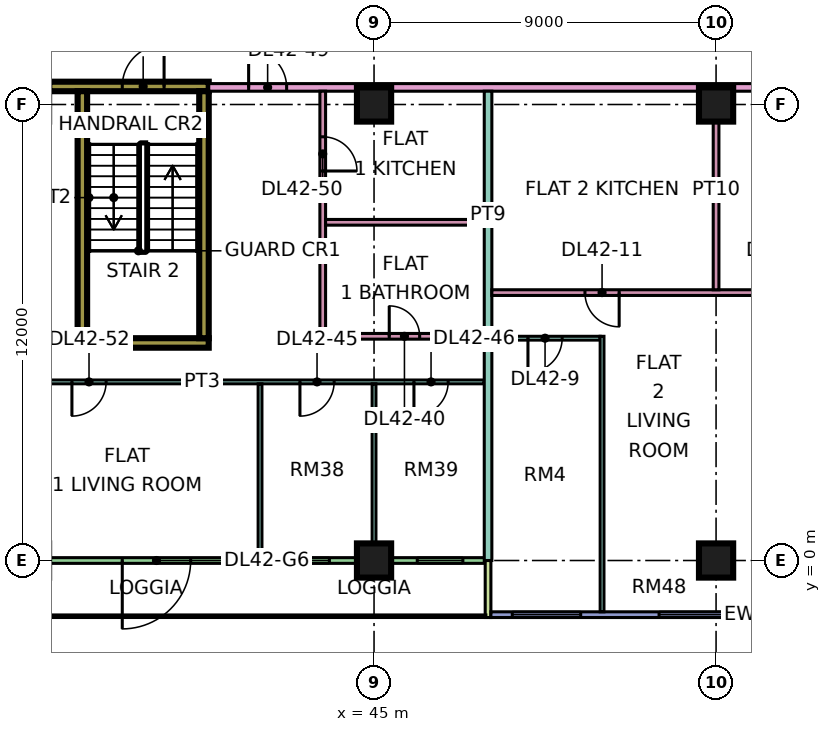
"""IFC4 building model, lengths in metres.
Left out: names, types, materials, properties, quantities, classifications, styles, units other than length and angle.
Written with IfcOpenShell. Run it as: python <this file> out.ifc"""

import sys

from ifc_helpers import new_model, si_unit, direction, frame, frame_2d, origin, origin_2d, place, context, subcontext, project, spatial, rectangle, extrude, element, fill, save


model = new_model("IFC4")
c1 = context("Model", 3, precision=1e-05, world=origin(), true_north=direction((0.0, 1.0)))
c2 = subcontext(c1, "Body", "Model", "MODEL_VIEW")
j1 = project(units=[si_unit("LENGTHUNIT", "METRE"), si_unit("PLANEANGLEUNIT", "RADIAN")], contexts=[c1])
p1 = place(None, origin())
s1 = spatial("IfcSite", under=j1, at=p1, CompositionType="ELEMENT")
p2 = place(p1, origin())
s2 = spatial("IfcBuilding", under=s1, at=p2, CompositionType="ELEMENT")
p3 = place(p2, frame((0.0, 0.0, 183.65)))
s3 = spatial("IfcBuildingStorey", under=s2, at=p3, CompositionType="ELEMENT", Elevation=183.65)
for number, where, z_axis, x_axis in (
    (1, (45.0, 0.0, 0.0), (0.0, 0.0, 1.0), (1.0, 0.0, 0.0)),
    (2, (45.0, 12.0, 0.0), (0.0, 0.0, 1.0), (1.0, 0.0, 0.0)),
    (3, (54.0, 0.0, 0.0), (0.0, 0.0, 1.0), (1.0, 0.0, 0.0)),
    (4, (54.0, 12.0, 0.0), (0.0, 0.0, 1.0), (1.0, 0.0, 0.0)),
):
    element("IfcColumn", number, at=place(p3, frame(where, z_axis=z_axis, x_axis=x_axis)), inside=s3, PredefinedType="COLUMN", context=c2, shape_type="SweptSolid", body=[
        extrude(rectangle(XDim=0.9, YDim=0.9, at=origin_2d()), origin(), (0.0, 0.0, 1.0), 3.75),
    ])
p4 = place(p3, frame((37.2, 5.725, 0.0), z_axis=(0.0, 0.0, 1.0), x_axis=(1.0, 0.0, 0.0)))
e5 = element("IfcWall", 5, at=p4, inside=s3, PredefinedType="SHEAR", context=c2, shape_type="SweptSolid", body=[
    extrude(rectangle(XDim=3.45, YDim=0.25, at=frame_2d((1.725, 0.0))), origin(), (0.0, 0.0, 1.0), 3.75),
])
p5 = place(p3, frame((36.45, 12.475, 0.0), z_axis=(0.0, 0.0, 1.0), x_axis=(1.0, 0.0, 0.0)))
e6 = element("IfcWall", 6, at=p5, inside=s3, PredefinedType="SHEAR", context=c2, shape_type="SweptSolid", body=[
    extrude(rectangle(XDim=4.2, YDim=0.25, at=frame_2d((2.1, 0.0))), origin(), (0.0, 0.0, 1.0), 3.75),
])
p6 = place(p5, frame((1.925, 0.0, 0.0)))
e7 = element("IfcOpeningElement", 7, at=p6, cuts=e6, PredefinedType="OPENING", context=c2, shape_type="SweptSolid", body=[
    extrude(rectangle(XDim=1.1, YDim=2.2, at=frame_2d((0.55, 1.1))), frame((0.0, 0.135, 0.0), z_axis=(0.0, -1.0, 0.0), x_axis=(1.0, 0.0, 0.0)), (0.0, 0.0, 1.0), 0.27),
])
for number, where, z_axis, x_axis in (
    (8, (37.325, 5.85, 0.0), (0.0, 0.0, 1.0), (0.0, 1.0, 0.0)),
    (9, (40.525, 5.85, 0.0), (0.0, 0.0, 1.0), (0.0, 1.0, 0.0)),
):
    element("IfcWall", number, at=place(p3, frame(where, z_axis=z_axis, x_axis=x_axis)), inside=s3, PredefinedType="SHEAR", context=c2, shape_type="SweptSolid", body=[
        extrude(rectangle(XDim=6.5, YDim=0.25, at=frame_2d((3.25, 0.0))), origin(), (0.0, 0.0, 1.0), 3.75),
    ])
p7 = place(p3, frame((36.075, 0.0, 0.0), z_axis=(0.0, 0.0, 1.0), x_axis=(1.0, 0.0, 0.0)))
e10 = element("IfcWall", 10, at=p7, inside=s3, PredefinedType="SOLIDWALL", context=c2, shape_type="SweptSolid", body=[
    extrude(rectangle(XDim=11.85, YDim=0.15, at=frame_2d((5.925, 0.0))), origin(), (0.0, 0.0, 1.0), 3.35),
])
p8 = place(p7, frame((2.3, 0.0, 0.0)))
e11 = element("IfcOpeningElement", 11, at=p8, cuts=e10, PredefinedType="OPENING", context=c2, shape_type="SweptSolid", body=[
    extrude(rectangle(XDim=1.8, YDim=2.4, at=frame_2d((0.9, 1.2))), frame((0.0, 0.085, 0.0), z_axis=(0.0, -1.0, 0.0), x_axis=(1.0, 0.0, 0.0)), (0.0, 0.0, 1.0), 0.17),
])
p9 = place(p7, frame((6.55, 0.0, 0.45)))
e12 = element("IfcOpeningElement", 12, at=p9, cuts=e10, PredefinedType="OPENING", context=c2, shape_type="SweptSolid", body=[
    extrude(rectangle(XDim=1.2, YDim=2.4, at=frame_2d((0.6, 1.2))), frame((0.0, 0.085, 0.0), z_axis=(0.0, -1.0, 0.0), x_axis=(1.0, 0.0, 0.0)), (0.0, 0.0, 1.0), 0.17),
])
p10 = place(p7, frame((10.062, 0.0, 0.45)))
e13 = element("IfcOpeningElement", 13, at=p10, cuts=e10, PredefinedType="OPENING", context=c2, shape_type="SweptSolid", body=[
    extrude(rectangle(XDim=1.2, YDim=2.4, at=frame_2d((0.6, 1.2))), frame((0.0, 0.085, 0.0), z_axis=(0.0, -1.0, 0.0), x_axis=(1.0, 0.0, 0.0)), (0.0, 0.0, 1.0), 0.17),
])
p11 = place(p3, frame((48.0, -1.5, 0.0), z_axis=(0.0, 0.0, 1.0), x_axis=(0.0, 1.0, 0.0)))
e14 = element("IfcWall", 14, at=p11, inside=s3, PredefinedType="SOLIDWALL", context=c2, shape_type="SweptSolid", body=[
    extrude(rectangle(XDim=1.5, YDim=0.15, at=frame_2d((0.75, 0.0))), origin(), (0.0, 0.0, 1.0), 3.35),
])
p12 = place(p3, frame((48.075, -1.425, 0.0), z_axis=(0.0, 0.0, 1.0), x_axis=(1.0, 0.0, 0.0)))
e15 = element("IfcWall", 15, at=p12, inside=s3, PredefinedType="SOLIDWALL", context=c2, shape_type="SweptSolid", body=[
    extrude(rectangle(XDim=13.425, YDim=0.15, at=frame_2d((6.712, 0.0))), origin(), (0.0, 0.0, 1.0), 3.35),
])
p13 = place(p12, frame((0.562, 0.0, 0.45)))
e16 = element("IfcOpeningElement", 16, at=p13, cuts=e15, PredefinedType="OPENING", context=c2, shape_type="SweptSolid", body=[
    extrude(rectangle(XDim=1.8, YDim=2.4, at=frame_2d((0.9, 1.2))), frame((0.0, 0.085, 0.0), z_axis=(0.0, -1.0, 0.0), x_axis=(1.0, 0.0, 0.0)), (0.0, 0.0, 1.0), 0.17),
])
p14 = place(p12, frame((4.425, 0.0, 0.45)))
e17 = element("IfcOpeningElement", 17, at=p14, cuts=e15, PredefinedType="OPENING", context=c2, shape_type="SweptSolid", body=[
    extrude(rectangle(XDim=3.0, YDim=2.4, at=frame_2d((1.5, 1.2))), frame((0.0, 0.085, 0.0), z_axis=(0.0, -1.0, 0.0), x_axis=(1.0, 0.0, 0.0)), (0.0, 0.0, 1.0), 0.17),
])
p15 = place(p12, frame((9.525, 0.0, 0.45)))
e18 = element("IfcOpeningElement", 18, at=p15, cuts=e15, PredefinedType="OPENING", context=c2, shape_type="SweptSolid", body=[
    extrude(rectangle(XDim=1.8, YDim=2.4, at=frame_2d((0.9, 1.2))), frame((0.0, 0.085, 0.0), z_axis=(0.0, -1.0, 0.0), x_axis=(1.0, 0.0, 0.0)), (0.0, 0.0, 1.0), 0.17),
])
p16 = place(p12, frame((12.225, 0.0, 0.45)))
e19 = element("IfcOpeningElement", 19, at=p16, cuts=e15, PredefinedType="OPENING", context=c2, shape_type="SweptSolid", body=[
    extrude(rectangle(XDim=0.9, YDim=2.4, at=frame_2d((0.45, 1.2))), frame((0.0, 0.085, 0.0), z_axis=(0.0, -1.0, 0.0), x_axis=(1.0, 0.0, 0.0)), (0.0, 0.0, 1.0), 0.17),
])
p17 = place(p3, frame((33.05, 4.7, 0.0), z_axis=(0.0, 0.0, 1.0), x_axis=(1.0, 0.0, 0.0)))
e20 = element("IfcWall", 20, at=p17, inside=s3, PredefinedType="PARTITIONING", context=c2, shape_type="SweptSolid", body=[
    extrude(rectangle(XDim=14.85, YDim=0.1, at=frame_2d((7.425, 0.0))), origin(), (0.0, 0.0, 1.0), 3.35),
])
p18 = place(p17, frame((10.0, 0.0, 0.0)))
e21 = element("IfcOpeningElement", 21, at=p18, cuts=e20, PredefinedType="OPENING", context=c2, shape_type="SweptSolid", body=[
    extrude(rectangle(XDim=0.9, YDim=2.1, at=frame_2d((0.45, 1.05))), frame((0.0, 0.06, 0.0), z_axis=(0.0, -1.0, 0.0), x_axis=(1.0, 0.0, 0.0)), (0.0, 0.0, 1.0), 0.12),
])
p19 = place(p17, frame((13.0, 0.0, 0.0)))
e22 = element("IfcOpeningElement", 22, at=p19, cuts=e20, PredefinedType="OPENING", context=c2, shape_type="SweptSolid", body=[
    extrude(rectangle(XDim=0.9, YDim=2.1, at=frame_2d((0.45, 1.05))), frame((0.0, 0.06, 0.0), z_axis=(0.0, -1.0, 0.0), x_axis=(1.0, 0.0, 0.0)), (0.0, 0.0, 1.0), 0.12),
])
p20 = place(p17, frame((4.0, 0.0, 0.0)))
e23 = element("IfcOpeningElement", 23, at=p20, cuts=e20, PredefinedType="OPENING", context=c2, shape_type="SweptSolid", body=[
    extrude(rectangle(XDim=0.9, YDim=2.1, at=frame_2d((0.45, 1.05))), frame((0.0, 0.06, 0.0), z_axis=(0.0, -1.0, 0.0), x_axis=(1.0, 0.0, 0.0)), (0.0, 0.0, 1.0), 0.12),
])
p21 = place(p3, frame((40.65, 12.45, 0.0), z_axis=(0.0, 0.0, 1.0), x_axis=(1.0, 0.0, 0.0)))
e24 = element("IfcWall", 24, at=p21, inside=s3, PredefinedType="PARTITIONING", context=c2, shape_type="SweptSolid", body=[
    extrude(rectangle(XDim=22.276, YDim=0.2, at=frame_2d((11.138, 0.0))), origin(), (0.0, 0.0, 1.0), 3.35),
])
p22 = place(p21, frame((20.1, 0.0, 0.0)))
e25 = element("IfcOpeningElement", 25, at=p22, cuts=e24, PredefinedType="OPENING", context=c2, shape_type="SweptSolid", body=[
    extrude(rectangle(XDim=1.0, YDim=2.1, at=frame_2d((0.5, 1.05))), frame((0.0, 0.11, 0.0), z_axis=(0.0, -1.0, 0.0), x_axis=(1.0, 0.0, 0.0)), (0.0, 0.0, 1.0), 0.22),
])
p23 = place(p21, frame((1.05, 0.0, 0.0)))
e26 = element("IfcOpeningElement", 26, at=p23, cuts=e24, PredefinedType="OPENING", context=c2, shape_type="SweptSolid", body=[
    extrude(rectangle(XDim=1.0, YDim=2.1, at=frame_2d((0.5, 1.05))), frame((0.0, 0.11, 0.0), z_axis=(0.0, -1.0, 0.0), x_axis=(1.0, 0.0, 0.0)), (0.0, 0.0, 1.0), 0.22),
])
p24 = place(p3, frame((42.0, 0.074, 0.0), z_axis=(0.0, 0.0, 1.0), x_axis=(0.0, 1.0, 0.0)))
e27 = element("IfcWall", 27, at=p24, inside=s3, PredefinedType="PARTITIONING", context=c2, shape_type="SweptSolid", body=[
    extrude(rectangle(XDim=4.576, YDim=0.1, at=frame_2d((2.288, 0.0))), origin(), (0.0, 0.0, 1.0), 3.35),
])
p25 = place(p3, frame((43.65, 5.825, 0.0), z_axis=(0.0, 0.0, 1.0), x_axis=(0.0, 1.0, 0.0)))
e28 = element("IfcWall", 28, at=p25, inside=s3, PredefinedType="PARTITIONING", context=c2, shape_type="SweptSolid", body=[
    extrude(rectangle(XDim=6.525, YDim=0.15, at=frame_2d((3.263, 0.0))), origin(), (0.0, 0.0, 1.0), 3.35),
])
p26 = place(p25, frame((4.425, 0.0, 0.0)))
e29 = element("IfcOpeningElement", 29, at=p26, cuts=e28, PredefinedType="OPENING", context=c2, shape_type="SweptSolid", body=[
    extrude(rectangle(XDim=0.9, YDim=2.1, at=frame_2d((0.45, 1.05))), frame((0.0, 0.085, 0.0), z_axis=(0.0, -1.0, 0.0), x_axis=(1.0, 0.0, 0.0)), (0.0, 0.0, 1.0), 0.17),
])
p27 = place(p3, frame((43.725, 5.9, 0.0), z_axis=(0.0, 0.0, 1.0), x_axis=(1.0, 0.0, 0.0)))
e30 = element("IfcWall", 30, at=p27, inside=s3, PredefinedType="PARTITIONING", context=c2, shape_type="SweptSolid", body=[
    extrude(rectangle(XDim=4.175, YDim=0.15, at=frame_2d((2.087, 0.0))), origin(), (0.0, 0.0, 1.0), 3.35),
])
p28 = place(p27, frame((1.675, 0.0, 0.0)))
e31 = element("IfcOpeningElement", 31, at=p28, cuts=e30, PredefinedType="OPENING", context=c2, shape_type="SweptSolid", body=[
    extrude(rectangle(XDim=0.8, YDim=2.1, at=frame_2d((0.4, 1.05))), frame((0.0, 0.085, 0.0), z_axis=(0.0, -1.0, 0.0), x_axis=(1.0, 0.0, 0.0)), (0.0, 0.0, 1.0), 0.17),
])
p29 = place(p3, frame((43.725, 8.9, 0.0), z_axis=(0.0, 0.0, 1.0), x_axis=(1.0, 0.0, 0.0)))
e32 = element("IfcWall", 32, at=p29, inside=s3, PredefinedType="PARTITIONING", context=c2, shape_type="SweptSolid", body=[
    extrude(rectangle(XDim=4.175, YDim=0.15, at=frame_2d((2.087, 0.0))), origin(), (0.0, 0.0, 1.0), 3.35),
])
p30 = place(p3, frame((45.0, 0.074, 0.0), z_axis=(0.0, 0.0, 1.0), x_axis=(0.0, 1.0, 0.0)))
e33 = element("IfcWall", 33, at=p30, inside=s3, PredefinedType="PARTITIONING", context=c2, shape_type="SweptSolid", body=[
    extrude(rectangle(XDim=4.576, YDim=0.1, at=frame_2d((2.288, 0.0))), origin(), (0.0, 0.0, 1.0), 3.35),
])
p31 = place(p3, frame((48.0, 0.0, 0.0), z_axis=(0.0, 0.0, 1.0), x_axis=(0.0, 1.0, 0.0)))
e34 = element("IfcWall", 34, at=p31, inside=s3, PredefinedType="PARTITIONING", context=c2, shape_type="SweptSolid", body=[
    extrude(rectangle(XDim=5.9, YDim=0.2, at=frame_2d((2.95, 0.0))), origin(), (0.0, 0.0, 1.0), 3.35),
])
p32 = place(p3, frame((48.0, 5.825, 0.0), z_axis=(0.0, 0.0, 1.0), x_axis=(0.0, 1.0, 0.0)))
e35 = element("IfcWall", 35, at=p32, inside=s3, PredefinedType="PARTITIONING", context=c2, shape_type="SweptSolid", body=[
    extrude(rectangle(XDim=6.525, YDim=0.2, at=frame_2d((3.263, 0.0))), origin(), (0.0, 0.0, 1.0), 3.35),
])
p33 = place(p3, frame((48.1, 5.85, 0.0), z_axis=(0.0, 0.0, 1.0), x_axis=(1.0, 0.0, 0.0)))
e36 = element("IfcWall", 36, at=p33, inside=s3, PredefinedType="PARTITIONING", context=c2, shape_type="SweptSolid", body=[
    extrude(rectangle(XDim=2.85, YDim=0.1, at=frame_2d((1.425, 0.0))), origin(), (0.0, 0.0, 1.0), 3.35),
])
p34 = place(p33, frame((0.95, 0.0, 0.0)))
e37 = element("IfcOpeningElement", 37, at=p34, cuts=e36, PredefinedType="OPENING", context=c2, shape_type="SweptSolid", body=[
    extrude(rectangle(XDim=0.9, YDim=2.1, at=frame_2d((0.45, 1.05))), frame((0.0, 0.06, 0.0), z_axis=(0.0, -1.0, 0.0), x_axis=(1.0, 0.0, 0.0)), (0.0, 0.0, 1.0), 0.12),
])
p35 = place(p3, frame((48.1, 7.05, 0.0), z_axis=(0.0, 0.0, 1.0), x_axis=(1.0, 0.0, 0.0)))
e38 = element("IfcWall", 38, at=p35, inside=s3, PredefinedType="PARTITIONING", context=c2, shape_type="SweptSolid", body=[
    extrude(rectangle(XDim=11.375, YDim=0.15, at=frame_2d((5.688, 0.0))), origin(), (0.0, 0.0, 1.0), 3.35),
])
p36 = place(p35, frame((7.2, 0.0, 0.0)))
e39 = element("IfcOpeningElement", 39, at=p36, cuts=e38, PredefinedType="OPENING", context=c2, shape_type="SweptSolid", body=[
    extrude(rectangle(XDim=0.8, YDim=2.1, at=frame_2d((0.4, 1.05))), frame((0.0, 0.085, 0.0), z_axis=(0.0, -1.0, 0.0), x_axis=(1.0, 0.0, 0.0)), (0.0, 0.0, 1.0), 0.17),
])
p37 = place(p35, frame((2.45, 0.0, 0.0)))
e40 = element("IfcOpeningElement", 40, at=p37, cuts=e38, PredefinedType="OPENING", context=c2, shape_type="SweptSolid", body=[
    extrude(rectangle(XDim=0.9, YDim=2.1, at=frame_2d((0.45, 1.05))), frame((0.0, 0.085, 0.0), z_axis=(0.0, -1.0, 0.0), x_axis=(1.0, 0.0, 0.0)), (0.0, 0.0, 1.0), 0.17),
])
p38 = place(p35, frame((9.9, 0.0, 0.0)))
e41 = element("IfcOpeningElement", 41, at=p38, cuts=e38, PredefinedType="OPENING", context=c2, shape_type="SweptSolid", body=[
    extrude(rectangle(XDim=0.8, YDim=2.1, at=frame_2d((0.4, 1.05))), frame((0.0, 0.085, 0.0), z_axis=(0.0, -1.0, 0.0), x_axis=(1.0, 0.0, 0.0)), (0.0, 0.0, 1.0), 0.17),
])
p39 = place(p3, frame((51.0, -1.35, 0.0), z_axis=(0.0, 0.0, 1.0), x_axis=(0.0, 1.0, 0.0)))
e42 = element("IfcWall", 42, at=p39, inside=s3, PredefinedType="PARTITIONING", context=c2, shape_type="SweptSolid", body=[
    extrude(rectangle(XDim=7.25, YDim=0.1, at=frame_2d((3.625, 0.0))), origin(), (0.0, 0.0, 1.0), 3.35),
])
p40 = place(p3, frame((54.0, 7.125, 0.0), z_axis=(0.0, 0.0, 1.0), x_axis=(0.0, 1.0, 0.0)))
e43 = element("IfcWall", 43, at=p40, inside=s3, PredefinedType="PARTITIONING", context=c2, shape_type="SweptSolid", body=[
    extrude(rectangle(XDim=5.225, YDim=0.15, at=frame_2d((2.613, 0.0))), origin(), (0.0, 0.0, 1.0), 3.35),
])
p41 = place(p8, frame((1.8, 0.0, 0.0), z_axis=(0.0, 0.0, 1.0), x_axis=(-1.0, 0.0, 0.0)))
e44 = element("IfcDoor", 44, at=p41, inside=s3, OperationType="DOUBLE_DOOR_SINGLE_SWING", PredefinedType="DOOR", context=c2, shape_type="SweptSolid", body=[
    extrude(rectangle(XDim=1.8, YDim=2.4, at=frame_2d((0.9, 1.2))), frame((0.0, 0.025, 0.0), z_axis=(0.0, -1.0, 0.0), x_axis=(1.0, 0.0, 0.0)), (0.0, 0.0, 1.0), 0.05),
])
fill(e11, e44)
p42 = place(p9, origin())
e45 = element("IfcWindow", 45, at=p42, inside=s3, PartitioningType="SINGLE_PANEL", PredefinedType="WINDOW", context=c2, shape_type="SweptSolid", body=[
    extrude(rectangle(XDim=1.2, YDim=2.4, at=frame_2d((0.6, 1.2))), frame((0.0, 0.03, 0.0), z_axis=(0.0, -1.0, 0.0), x_axis=(1.0, 0.0, 0.0)), (0.0, 0.0, 1.0), 0.06),
])
fill(e12, e45)
p43 = place(p10, origin())
e46 = element("IfcWindow", 46, at=p43, inside=s3, PartitioningType="SINGLE_PANEL", PredefinedType="WINDOW", context=c2, shape_type="SweptSolid", body=[
    extrude(rectangle(XDim=1.2, YDim=2.4, at=frame_2d((0.6, 1.2))), frame((0.0, 0.03, 0.0), z_axis=(0.0, -1.0, 0.0), x_axis=(1.0, 0.0, 0.0)), (0.0, 0.0, 1.0), 0.06),
])
fill(e13, e46)
p44 = place(p13, origin())
e47 = element("IfcWindow", 47, at=p44, inside=s3, PartitioningType="SINGLE_PANEL", PredefinedType="WINDOW", context=c2, shape_type="SweptSolid", body=[
    extrude(rectangle(XDim=1.8, YDim=2.4, at=frame_2d((0.9, 1.2))), frame((0.0, 0.03, 0.0), z_axis=(0.0, -1.0, 0.0), x_axis=(1.0, 0.0, 0.0)), (0.0, 0.0, 1.0), 0.06),
])
fill(e16, e47)
p45 = place(p14, origin())
e48 = element("IfcWindow", 48, at=p45, inside=s3, PartitioningType="SINGLE_PANEL", PredefinedType="WINDOW", context=c2, shape_type="SweptSolid", body=[
    extrude(rectangle(XDim=3.0, YDim=2.4, at=frame_2d((1.5, 1.2))), frame((0.0, 0.03, 0.0), z_axis=(0.0, -1.0, 0.0), x_axis=(1.0, 0.0, 0.0)), (0.0, 0.0, 1.0), 0.06),
])
fill(e17, e48)
p46 = place(p6, frame((1.1, 0.0, 0.0), z_axis=(0.0, 0.0, 1.0), x_axis=(-1.0, 0.0, 0.0)))
e49 = element("IfcDoor", 49, at=p46, inside=s3, OperationType="SINGLE_SWING_RIGHT", PredefinedType="DOOR", context=c2, shape_type="SweptSolid", body=[
    extrude(rectangle(XDim=1.1, YDim=2.2, at=frame_2d((0.55, 1.1))), frame((0.0, 0.025, 0.0), z_axis=(0.0, -1.0, 0.0), x_axis=(1.0, 0.0, 0.0)), (0.0, 0.0, 1.0), 0.05),
])
fill(e7, e49)
p47 = place(p34, frame((0.9, 0.0, 0.0), z_axis=(0.0, 0.0, 1.0), x_axis=(-1.0, 0.0, 0.0)))
e50 = element("IfcDoor", 50, at=p47, inside=s3, OperationType="SINGLE_SWING_LEFT", PredefinedType="DOOR", context=c2, shape_type="SweptSolid", body=[
    extrude(rectangle(XDim=0.9, YDim=2.1, at=frame_2d((0.45, 1.05))), frame((0.0, 0.025, 0.0), z_axis=(0.0, -1.0, 0.0), x_axis=(1.0, 0.0, 0.0)), (0.0, 0.0, 1.0), 0.05),
])
fill(e37, e50)
p48 = place(p37, origin())
e51 = element("IfcDoor", 51, at=p48, inside=s3, OperationType="SINGLE_SWING_RIGHT", PredefinedType="DOOR", context=c2, shape_type="SweptSolid", body=[
    extrude(rectangle(XDim=0.9, YDim=2.1, at=frame_2d((0.45, 1.05))), frame((0.0, 0.025, 0.0), z_axis=(0.0, -1.0, 0.0), x_axis=(1.0, 0.0, 0.0)), (0.0, 0.0, 1.0), 0.05),
])
fill(e40, e51)
p49 = place(p28, origin())
e52 = element("IfcDoor", 52, at=p49, inside=s3, OperationType="SINGLE_SWING_LEFT", PredefinedType="DOOR", context=c2, shape_type="SweptSolid", body=[
    extrude(rectangle(XDim=0.8, YDim=2.1, at=frame_2d((0.4, 1.05))), frame((0.0, 0.025, 0.0), z_axis=(0.0, -1.0, 0.0), x_axis=(1.0, 0.0, 0.0)), (0.0, 0.0, 1.0), 0.05),
])
fill(e31, e52)
p50 = place(p18, frame((0.9, 0.0, 0.0), z_axis=(0.0, 0.0, 1.0), x_axis=(-1.0, 0.0, 0.0)))
e53 = element("IfcDoor", 53, at=p50, inside=s3, OperationType="SINGLE_SWING_LEFT", PredefinedType="DOOR", context=c2, shape_type="SweptSolid", body=[
    extrude(rectangle(XDim=0.9, YDim=2.1, at=frame_2d((0.45, 1.05))), frame((0.0, 0.025, 0.0), z_axis=(0.0, -1.0, 0.0), x_axis=(1.0, 0.0, 0.0)), (0.0, 0.0, 1.0), 0.05),
])
fill(e21, e53)
p51 = place(p19, frame((0.9, 0.0, 0.0), z_axis=(0.0, 0.0, 1.0), x_axis=(-1.0, 0.0, 0.0)))
e54 = element("IfcDoor", 54, at=p51, inside=s3, OperationType="SINGLE_SWING_LEFT", PredefinedType="DOOR", context=c2, shape_type="SweptSolid", body=[
    extrude(rectangle(XDim=0.9, YDim=2.1, at=frame_2d((0.45, 1.05))), frame((0.0, 0.025, 0.0), z_axis=(0.0, -1.0, 0.0), x_axis=(1.0, 0.0, 0.0)), (0.0, 0.0, 1.0), 0.05),
])
fill(e22, e54)
p52 = place(p23, origin())
e55 = element("IfcDoor", 55, at=p52, inside=s3, OperationType="SINGLE_SWING_LEFT", PredefinedType="DOOR", context=c2, shape_type="SweptSolid", body=[
    extrude(rectangle(XDim=1.0, YDim=2.1, at=frame_2d((0.5, 1.05))), frame((0.0, 0.025, 0.0), z_axis=(0.0, -1.0, 0.0), x_axis=(1.0, 0.0, 0.0)), (0.0, 0.0, 1.0), 0.05),
])
fill(e26, e55)
p53 = place(p26, frame((0.9, 0.0, 0.0), z_axis=(0.0, 0.0, 1.0), x_axis=(-1.0, 0.0, 0.0)))
e56 = element("IfcDoor", 56, at=p53, inside=s3, OperationType="SINGLE_SWING_LEFT", PredefinedType="DOOR", context=c2, shape_type="SweptSolid", body=[
    extrude(rectangle(XDim=0.9, YDim=2.1, at=frame_2d((0.45, 1.05))), frame((0.0, 0.025, 0.0), z_axis=(0.0, -1.0, 0.0), x_axis=(1.0, 0.0, 0.0)), (0.0, 0.0, 1.0), 0.05),
])
fill(e29, e56)
p54 = place(p20, frame((0.9, 0.0, 0.0), z_axis=(0.0, 0.0, 1.0), x_axis=(-1.0, 0.0, 0.0)))
e57 = element("IfcDoor", 57, at=p54, inside=s3, OperationType="SINGLE_SWING_LEFT", PredefinedType="DOOR", context=c2, shape_type="SweptSolid", body=[
    extrude(rectangle(XDim=0.9, YDim=2.1, at=frame_2d((0.45, 1.05))), frame((0.0, 0.025, 0.0), z_axis=(0.0, -1.0, 0.0), x_axis=(1.0, 0.0, 0.0)), (0.0, 0.0, 1.0), 0.05),
])
fill(e23, e57)
save(model, sys.argv[1])
